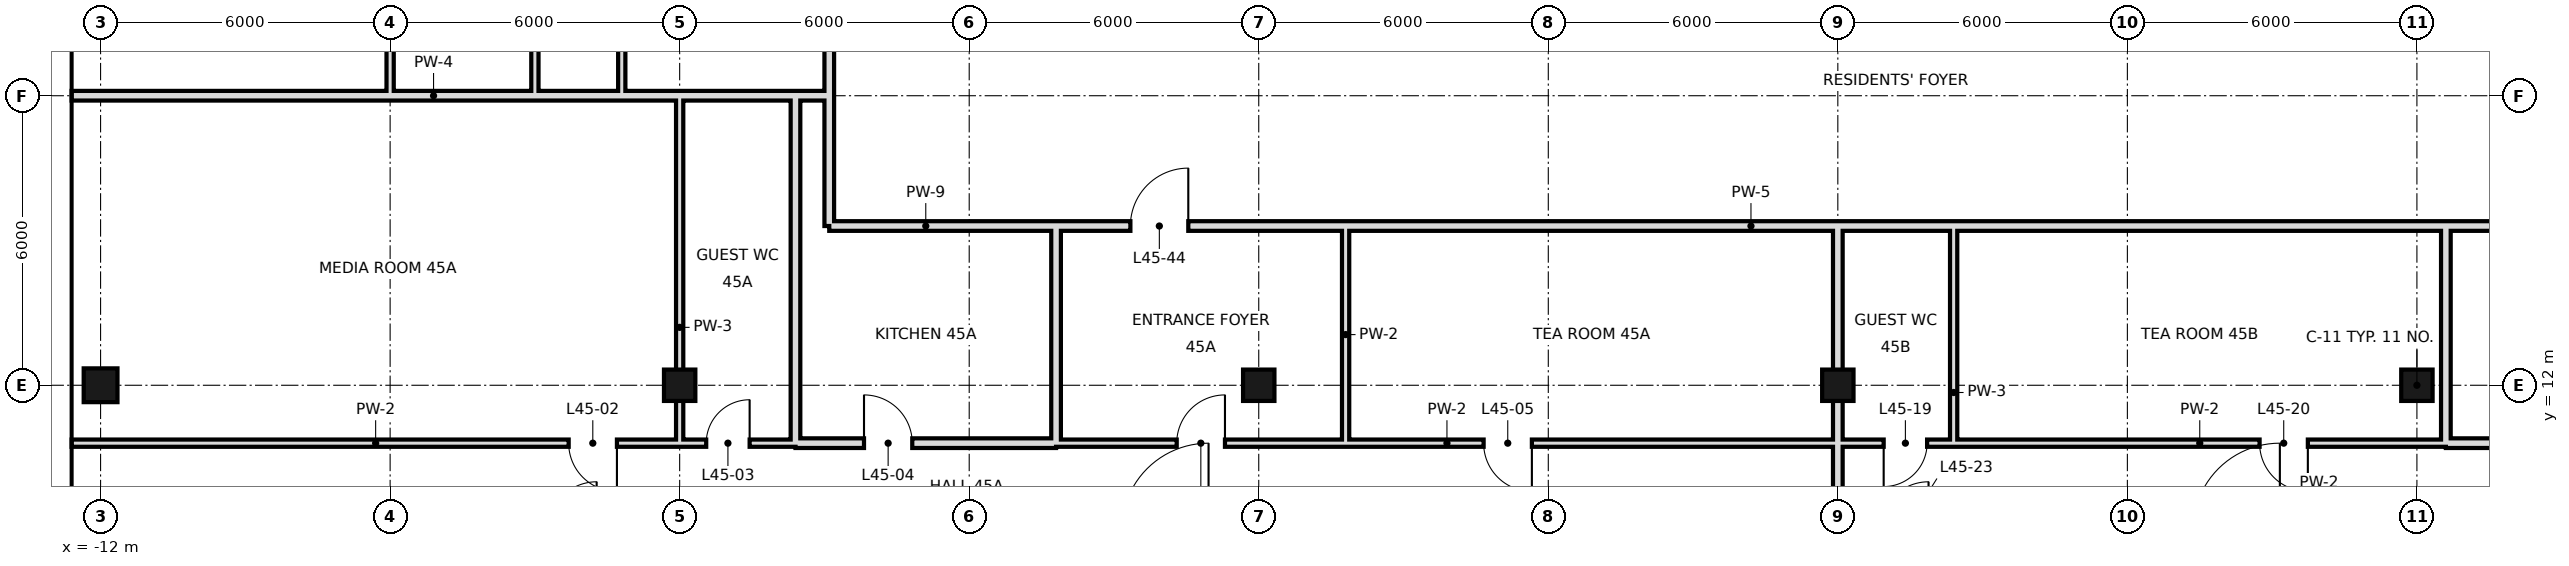
"""IFC4 building model, lengths in metres.
Left out: names, types, materials, properties, quantities, classifications, styles, units other than length and angle.
Written with IfcOpenShell. Run it as: python <this file> out.ifc"""

import sys

from ifc_helpers import new_model, si_unit, direction, frame, frame_2d, origin, origin_2d, place, context, subcontext, project, spatial, rectangle, hollow_rectangle, extrude, element, fill, save


model = new_model("IFC4")
c1 = context("Model", 3, precision=1e-05, world=origin(), true_north=direction((0.0, 1.0)))
c2 = subcontext(c1, "Body", "Model", "MODEL_VIEW")
j1 = project(units=[si_unit("LENGTHUNIT", "METRE"), si_unit("PLANEANGLEUNIT", "RADIAN")], contexts=[c1])
p1 = place(None, origin())
s1 = spatial("IfcSite", under=j1, at=p1, CompositionType="ELEMENT")
p2 = place(p1, origin())
s2 = spatial("IfcBuilding", under=s1, at=p2, CompositionType="ELEMENT")
p3 = place(p2, frame((0.0, 0.0, 195.6)))
s3 = spatial("IfcBuildingStorey", under=s2, at=p3, CompositionType="ELEMENT", Elevation=195.6)
p4 = place(p3, frame((-12.0, 12.0, 0.0), z_axis=(0.0, 0.0, 1.0), x_axis=(1.0, 0.0, 0.0)))
e1 = element("IfcColumn", 1, at=p4, inside=s3, PredefinedType="COLUMN", context=c2, shape_type="SweptSolid", body=[
    extrude(hollow_rectangle(XDim=0.7, YDim=0.7, WallThickness=0.036, at=origin_2d()), origin(), (0.0, 0.0, 1.0), 3.6),
])
for number, where, z_axis, x_axis in (
    (2, (0.0, 12.0, 0.0), (0.0, 0.0, 1.0), (1.0, 0.0, 0.0)),
    (3, (12.0, 12.0, 0.0), (0.0, 0.0, 1.0), (1.0, 0.0, 0.0)),
    (4, (24.0, 12.0, 0.0), (0.0, 0.0, 1.0), (1.0, 0.0, 0.0)),
    (5, (36.0, 12.0, 0.0), (0.0, 0.0, 1.0), (1.0, 0.0, 0.0)),
):
    element("IfcColumn", number, at=place(p3, frame(where, z_axis=z_axis, x_axis=x_axis)), inside=s3, PredefinedType="COLUMN", context=c2, shape_type="SweptSolid", body=[
        extrude(hollow_rectangle(XDim=0.65, YDim=0.65, WallThickness=0.032, at=origin_2d()), origin(), (0.0, 0.0, 1.0), 3.6),
    ])
p5 = place(p3, frame((-1.2, 18.0, 0.0), z_axis=(0.0, 0.0, 1.0), x_axis=(0.0, 1.0, 0.0)))
e6 = element("IfcWall", 6, at=p5, inside=s3, PredefinedType="PARTITIONING", context=c2, shape_type="SweptSolid", body=[
    extrude(rectangle(XDim=23.4, YDim=0.15, at=frame_2d((11.7, 0.0))), origin(), (0.0, 0.0, 1.0), 3.42),
])
p6 = place(p5, frame((20.5, 0.0, 0.0)))
e7 = element("IfcOpeningElement", 7, at=p6, cuts=e6, PredefinedType="OPENING", context=c2, shape_type="SweptSolid", body=[
    extrude(rectangle(XDim=1.0, YDim=2.4, at=frame_2d((0.5, 1.2))), frame((0.0, 0.085, 0.0), z_axis=(0.0, -1.0, 0.0), x_axis=(1.0, 0.0, 0.0)), (0.0, 0.0, 1.0), 0.17),
])
p7 = place(p5, frame((4.3, 0.0, 0.0)))
e8 = element("IfcOpeningElement", 8, at=p7, cuts=e6, PredefinedType="OPENING", context=c2, shape_type="SweptSolid", body=[
    extrude(rectangle(XDim=1.0, YDim=2.4, at=frame_2d((0.5, 1.2))), frame((0.0, 0.085, 0.0), z_axis=(0.0, -1.0, 0.0), x_axis=(1.0, 0.0, 0.0)), (0.0, 0.0, 1.0), 0.17),
])
p8 = place(p5, frame((15.1, 0.0, 0.0)))
e9 = element("IfcOpeningElement", 9, at=p8, cuts=e6, PredefinedType="OPENING", context=c2, shape_type="SweptSolid", body=[
    extrude(rectangle(XDim=1.0, YDim=2.4, at=frame_2d((0.5, 1.2))), frame((0.0, 0.085, 0.0), z_axis=(0.0, -1.0, 0.0), x_axis=(1.0, 0.0, 0.0)), (0.0, 0.0, 1.0), 0.17),
])
p9 = place(p3, frame((-3.0, 18.0, 0.0), z_axis=(0.0, 0.0, 1.0), x_axis=(0.0, 1.0, 0.0)))
e10 = element("IfcWall", 10, at=p9, inside=s3, PredefinedType="PARTITIONING", context=c2, shape_type="SweptSolid", body=[
    extrude(rectangle(XDim=12.0, YDim=0.15, at=frame_2d((6.0, 0.0))), origin(), (0.0, 0.0, 1.0), 3.42),
])
p10 = place(p9, frame((7.04, 0.0, 0.0)))
e11 = element("IfcOpeningElement", 11, at=p10, cuts=e10, PredefinedType="OPENING", context=c2, shape_type="SweptSolid", body=[
    extrude(rectangle(XDim=1.8, YDim=2.4, at=frame_2d((0.9, 1.2))), frame((0.0, 0.085, 0.0), z_axis=(0.0, -1.0, 0.0), x_axis=(1.0, 0.0, 0.0)), (0.0, 0.0, 1.0), 0.17),
])
p11 = place(p3, frame((-6.0, 18.0, 0.0), z_axis=(0.0, 0.0, 1.0), x_axis=(0.0, 1.0, 0.0)))
e12 = element("IfcWall", 12, at=p11, inside=s3, PredefinedType="PARTITIONING", context=c2, shape_type="SweptSolid", body=[
    extrude(rectangle(XDim=12.0, YDim=0.15, at=frame_2d((6.0, 0.0))), origin(), (0.0, 0.0, 1.0), 3.42),
])
p12 = place(p11, frame((7.04, 0.0, 0.0)))
e13 = element("IfcOpeningElement", 13, at=p12, cuts=e12, PredefinedType="OPENING", context=c2, shape_type="SweptSolid", body=[
    extrude(rectangle(XDim=1.8, YDim=2.4, at=frame_2d((0.9, 1.2))), frame((0.0, 0.085, 0.0), z_axis=(0.0, -1.0, 0.0), x_axis=(1.0, 0.0, 0.0)), (0.0, 0.0, 1.0), 0.17),
])
p13 = place(p3, frame((0.0, 10.8, 0.0), z_axis=(0.0, 0.0, 1.0), x_axis=(0.0, 1.0, 0.0)))
e14 = element("IfcWall", 14, at=p13, inside=s3, PredefinedType="PARTITIONING", context=c2, shape_type="SweptSolid", body=[
    extrude(rectangle(XDim=7.2, YDim=0.15, at=frame_2d((3.6, 0.0))), origin(), (0.0, 0.0, 1.0), 2.72),
])
p14 = place(p3, frame((13.8, 10.8, 0.0), z_axis=(0.0, 0.0, 1.0), x_axis=(0.0, 1.0, 0.0)))
e15 = element("IfcWall", 15, at=p14, inside=s3, PredefinedType="PARTITIONING", context=c2, shape_type="SweptSolid", body=[
    extrude(rectangle(XDim=4.5, YDim=0.15, at=frame_2d((2.25, 0.0))), origin(), (0.0, 0.0, 1.0), 3.42),
])
p15 = place(p3, frame((2.4, 10.8, 0.0), z_axis=(0.0, 0.0, 1.0), x_axis=(0.0, 1.0, 0.0)))
e16 = element("IfcWall", 16, at=p15, inside=s3, PredefinedType="SOLIDWALL", context=c2, shape_type="SweptSolid", body=[
    extrude(rectangle(XDim=7.2, YDim=0.2, at=frame_2d((3.6, 0.0))), origin(), (0.0, 0.0, 1.0), 2.72),
])
p16 = place(p3, frame((24.0, 0.0, 0.0), z_axis=(0.0, 0.0, 1.0), x_axis=(0.0, 1.0, 0.0)))
e17 = element("IfcWall", 17, at=p16, inside=s3, PredefinedType="SOLIDWALL", context=c2, shape_type="SweptSolid", body=[
    extrude(rectangle(XDim=15.3, YDim=0.2, at=frame_2d((7.65, 0.0))), origin(), (0.0, 0.0, 1.0), 2.72),
])
p17 = place(p3, frame((26.4, 10.8, 0.0), z_axis=(0.0, 0.0, 1.0), x_axis=(0.0, 1.0, 0.0)))
e18 = element("IfcWall", 18, at=p17, inside=s3, PredefinedType="PARTITIONING", context=c2, shape_type="SweptSolid", body=[
    extrude(rectangle(XDim=4.5, YDim=0.15, at=frame_2d((2.25, 0.0))), origin(), (0.0, 0.0, 1.0), 3.42),
])
p18 = place(p3, frame((3.1, 18.0, 0.0), z_axis=(0.0, 0.0, 1.0), x_axis=(0.0, 1.0, 0.0)))
e19 = element("IfcWall", 19, at=p18, inside=s3, PredefinedType="SOLIDWALL", context=c2, shape_type="SweptSolid", body=[
    extrude(rectangle(XDim=23.4, YDim=0.2, at=frame_2d((11.7, 0.0))), origin(), (0.0, 0.0, 1.0), 2.97),
])
p19 = place(p18, frame((20.4, 0.0, 0.0)))
e20 = element("IfcOpeningElement", 20, at=p19, cuts=e19, PredefinedType="OPENING", context=c2, shape_type="SweptSolid", body=[
    extrude(rectangle(XDim=1.2, YDim=2.4, at=frame_2d((0.6, 1.2))), frame((0.0, 0.11, 0.0), z_axis=(0.0, -1.0, 0.0), x_axis=(1.0, 0.0, 0.0)), (0.0, 0.0, 1.0), 0.22),
])
p20 = place(p3, frame((3.1, 15.3, 0.0), z_axis=(0.0, 0.0, 1.0), x_axis=(0.0, 1.0, 0.0)))
e21 = element("IfcWall", 21, at=p20, inside=s3, PredefinedType="SOLIDWALL", context=c2, shape_type="SweptSolid", body=[
    extrude(rectangle(XDim=2.7, YDim=0.2, at=frame_2d((1.35, 0.0))), origin(), (0.0, 0.0, 1.0), 2.97),
])
for number, where, z_axis, x_axis in (
    (22, (36.6, 10.8, 0.0), (0.0, 0.0, 1.0), (0.0, 1.0, 0.0)),
    (23, (7.8, 10.8, 0.0), (0.0, 0.0, 1.0), (0.0, 1.0, 0.0)),
):
    element("IfcWall", number, at=place(p3, frame(where, z_axis=z_axis, x_axis=x_axis)), inside=s3, PredefinedType="SOLIDWALL", context=c2, shape_type="SweptSolid", body=[
        extrude(rectangle(XDim=4.5, YDim=0.2, at=frame_2d((2.25, 0.0))), origin(), (0.0, 0.0, 1.0), 2.72),
    ])
p21 = place(p3, frame((2.4, 10.8, 0.0), z_axis=(0.0, 0.0, 1.0), x_axis=(1.0, 0.0, 0.0)))
e24 = element("IfcWall", 24, at=p21, inside=s3, PredefinedType="SOLIDWALL", context=c2, shape_type="SweptSolid", body=[
    extrude(rectangle(XDim=5.4, YDim=0.2, at=frame_2d((2.7, 0.0))), origin(), (0.0, 0.0, 1.0), 2.72),
])
p22 = place(p21, frame((1.42, 0.0, 0.0)))
e25 = element("IfcOpeningElement", 25, at=p22, cuts=e24, PredefinedType="OPENING", context=c2, shape_type="SweptSolid", body=[
    extrude(rectangle(XDim=1.0, YDim=2.4, at=frame_2d((0.5, 1.2))), frame((0.0, 0.11, 0.0), z_axis=(0.0, -1.0, 0.0), x_axis=(1.0, 0.0, 0.0)), (0.0, 0.0, 1.0), 0.22),
])
p23 = place(p3, frame((36.6, 10.8, 0.0), z_axis=(0.0, 0.0, 1.0), x_axis=(1.0, 0.0, 0.0)))
e26 = element("IfcWall", 26, at=p23, inside=s3, PredefinedType="SOLIDWALL", context=c2, shape_type="SweptSolid", body=[
    extrude(rectangle(XDim=5.4, YDim=0.2, at=frame_2d((2.7, 0.0))), origin(), (0.0, 0.0, 1.0), 2.72),
])
p24 = place(p23, frame((2.98, 0.0, 0.0)))
e27 = element("IfcOpeningElement", 27, at=p24, cuts=e26, PredefinedType="OPENING", context=c2, shape_type="SweptSolid", body=[
    extrude(rectangle(XDim=1.0, YDim=2.4, at=frame_2d((0.5, 1.2))), frame((0.0, 0.11, 0.0), z_axis=(0.0, -1.0, 0.0), x_axis=(1.0, 0.0, 0.0)), (0.0, 0.0, 1.0), 0.22),
])
p25 = place(p3, frame((-12.6, 10.8, 0.0), z_axis=(0.0, 0.0, 1.0), x_axis=(1.0, 0.0, 0.0)))
e28 = element("IfcWall", 28, at=p25, inside=s3, PredefinedType="PARTITIONING", context=c2, shape_type="SweptSolid", body=[
    extrude(rectangle(XDim=12.6, YDim=0.15, at=frame_2d((6.3, 0.0))), origin(), (0.0, 0.0, 1.0), 3.42),
])
p26 = place(p25, frame((10.3, 0.0, 0.0)))
e29 = element("IfcOpeningElement", 29, at=p26, cuts=e28, PredefinedType="OPENING", context=c2, shape_type="SweptSolid", body=[
    extrude(rectangle(XDim=1.0, YDim=2.4, at=frame_2d((0.5, 1.2))), frame((0.0, 0.085, 0.0), z_axis=(0.0, -1.0, 0.0), x_axis=(1.0, 0.0, 0.0)), (0.0, 0.0, 1.0), 0.17),
])
p27 = place(p3, frame((7.8, 10.8, 0.0), z_axis=(0.0, 0.0, 1.0), x_axis=(1.0, 0.0, 0.0)))
e30 = element("IfcWall", 30, at=p27, inside=s3, PredefinedType="PARTITIONING", context=c2, shape_type="SweptSolid", body=[
    extrude(rectangle(XDim=16.2, YDim=0.15, at=frame_2d((8.1, 0.0))), origin(), (0.0, 0.0, 1.0), 3.42),
])
p28 = place(p27, frame((2.5, 0.0, 0.0)))
e31 = element("IfcOpeningElement", 31, at=p28, cuts=e30, PredefinedType="OPENING", context=c2, shape_type="SweptSolid", body=[
    extrude(rectangle(XDim=1.0, YDim=2.4, at=frame_2d((0.5, 1.2))), frame((0.0, 0.085, 0.0), z_axis=(0.0, -1.0, 0.0), x_axis=(1.0, 0.0, 0.0)), (0.0, 0.0, 1.0), 0.17),
])
p29 = place(p27, frame((8.86, 0.0, 0.0)))
e32 = element("IfcOpeningElement", 32, at=p29, cuts=e30, PredefinedType="OPENING", context=c2, shape_type="SweptSolid", body=[
    extrude(rectangle(XDim=1.0, YDim=2.4, at=frame_2d((0.5, 1.2))), frame((0.0, 0.085, 0.0), z_axis=(0.0, -1.0, 0.0), x_axis=(1.0, 0.0, 0.0)), (0.0, 0.0, 1.0), 0.17),
])
p30 = place(p3, frame((26.4, 10.8, 0.0), z_axis=(0.0, 0.0, 1.0), x_axis=(1.0, 0.0, 0.0)))
e33 = element("IfcWall", 33, at=p30, inside=s3, PredefinedType="PARTITIONING", context=c2, shape_type="SweptSolid", body=[
    extrude(rectangle(XDim=10.2, YDim=0.15, at=frame_2d((5.1, 0.0))), origin(), (0.0, 0.0, 1.0), 3.42),
])
p31 = place(p30, frame((6.34, 0.0, 0.0)))
e34 = element("IfcOpeningElement", 34, at=p31, cuts=e33, PredefinedType="OPENING", context=c2, shape_type="SweptSolid", body=[
    extrude(rectangle(XDim=1.0, YDim=2.4, at=frame_2d((0.5, 1.2))), frame((0.0, 0.085, 0.0), z_axis=(0.0, -1.0, 0.0), x_axis=(1.0, 0.0, 0.0)), (0.0, 0.0, 1.0), 0.17),
])
p32 = place(p3, frame((0.0, 10.8, 0.0), z_axis=(0.0, 0.0, 1.0), x_axis=(1.0, 0.0, 0.0)))
e35 = element("IfcWall", 35, at=p32, inside=s3, PredefinedType="PARTITIONING", context=c2, shape_type="SweptSolid", body=[
    extrude(rectangle(XDim=2.4, YDim=0.15, at=frame_2d((1.2, 0.0))), origin(), (0.0, 0.0, 1.0), 3.42),
])
p33 = place(p32, frame((0.55, 0.0, 0.0)))
e36 = element("IfcOpeningElement", 36, at=p33, cuts=e35, PredefinedType="OPENING", context=c2, shape_type="SweptSolid", body=[
    extrude(rectangle(XDim=0.9, YDim=2.4, at=frame_2d((0.45, 1.2))), frame((0.0, 0.085, 0.0), z_axis=(0.0, -1.0, 0.0), x_axis=(1.0, 0.0, 0.0)), (0.0, 0.0, 1.0), 0.17),
])
p34 = place(p3, frame((24.0, 10.8, 0.0), z_axis=(0.0, 0.0, 1.0), x_axis=(1.0, 0.0, 0.0)))
e37 = element("IfcWall", 37, at=p34, inside=s3, PredefinedType="PARTITIONING", context=c2, shape_type="SweptSolid", body=[
    extrude(rectangle(XDim=2.4, YDim=0.15, at=frame_2d((1.2, 0.0))), origin(), (0.0, 0.0, 1.0), 3.42),
])
p35 = place(p34, frame((0.95, 0.0, 0.0)))
e38 = element("IfcOpeningElement", 38, at=p35, cuts=e37, PredefinedType="OPENING", context=c2, shape_type="SweptSolid", body=[
    extrude(rectangle(XDim=0.9, YDim=2.4, at=frame_2d((0.45, 1.2))), frame((0.0, 0.085, 0.0), z_axis=(0.0, -1.0, 0.0), x_axis=(1.0, 0.0, 0.0)), (0.0, 0.0, 1.0), 0.17),
])
p36 = place(p3, frame((7.8, 15.3, 0.0), z_axis=(0.0, 0.0, 1.0), x_axis=(1.0, 0.0, 0.0)))
e39 = element("IfcWall", 39, at=p36, inside=s3, PredefinedType="SOLIDWALL", context=c2, shape_type="SweptSolid", body=[
    extrude(rectangle(XDim=28.8, YDim=0.2, at=frame_2d((14.4, 0.0))), origin(), (0.0, 0.0, 1.0), 2.72),
])
p37 = place(p36, frame((1.54, 0.0, 0.0)))
e40 = element("IfcOpeningElement", 40, at=p37, cuts=e39, PredefinedType="OPENING", context=c2, shape_type="SweptSolid", body=[
    extrude(rectangle(XDim=1.2, YDim=2.4, at=frame_2d((0.6, 1.2))), frame((0.0, 0.11, 0.0), z_axis=(0.0, -1.0, 0.0), x_axis=(1.0, 0.0, 0.0)), (0.0, 0.0, 1.0), 0.22),
])
p38 = place(p3, frame((3.1, 15.3, 0.0), z_axis=(0.0, 0.0, 1.0), x_axis=(1.0, 0.0, 0.0)))
e41 = element("IfcWall", 41, at=p38, inside=s3, PredefinedType="SOLIDWALL", context=c2, shape_type="SweptSolid", body=[
    extrude(rectangle(XDim=4.7, YDim=0.2, at=frame_2d((2.35, 0.0))), origin(), (0.0, 0.0, 1.0), 2.72),
])
p39 = place(p3, frame((36.6, 15.3, 0.0), z_axis=(0.0, 0.0, 1.0), x_axis=(1.0, 0.0, 0.0)))
e42 = element("IfcWall", 42, at=p39, inside=s3, PredefinedType="SOLIDWALL", context=c2, shape_type="SweptSolid", body=[
    extrude(rectangle(XDim=5.4, YDim=0.2, at=frame_2d((2.7, 0.0))), origin(), (0.0, 0.0, 1.0), 2.72),
])
p40 = place(p3, frame((2.4, 18.0, 0.0), z_axis=(0.0, 0.0, 1.0), x_axis=(1.0, 0.0, 0.0)))
e43 = element("IfcWall", 43, at=p40, inside=s3, PredefinedType="SOLIDWALL", context=c2, shape_type="SweptSolid", body=[
    extrude(rectangle(XDim=0.7, YDim=0.2, at=frame_2d((0.35, 0.0))), origin(), (0.0, 0.0, 1.0), 2.97),
])
p41 = place(p3, frame((-12.6, 18.0, 0.0), z_axis=(0.0, 0.0, 1.0), x_axis=(1.0, 0.0, 0.0)))
e44 = element("IfcWall", 44, at=p41, inside=s3, PredefinedType="SOLIDWALL", context=c2, shape_type="SweptSolid", body=[
    extrude(rectangle(XDim=15.0, YDim=0.2, at=frame_2d((7.5, 0.0))), origin(), (0.0, 0.0, 1.0), 2.72),
])
p42 = place(p28, frame((1.0, 0.0, 0.0), z_axis=(0.0, 0.0, 1.0), x_axis=(-1.0, 0.0, 0.0)))
e45 = element("IfcDoor", 45, at=p42, inside=s3, OperationType="SINGLE_SWING_LEFT", PredefinedType="DOOR", context=c2, shape_type="SweptSolid", body=[
    extrude(rectangle(XDim=1.0, YDim=2.4, at=frame_2d((0.5, 1.2))), frame((0.0, 0.025, 0.0), z_axis=(0.0, -1.0, 0.0), x_axis=(1.0, 0.0, 0.0)), (0.0, 0.0, 1.0), 0.05),
])
fill(e31, e45)
p43 = place(p26, origin())
e46 = element("IfcDoor", 46, at=p43, inside=s3, OperationType="SINGLE_SWING_RIGHT", PredefinedType="DOOR", context=c2, shape_type="SweptSolid", body=[
    extrude(rectangle(XDim=1.0, YDim=2.4, at=frame_2d((0.5, 1.2))), frame((0.0, 0.025, 0.0), z_axis=(0.0, -1.0, 0.0), x_axis=(1.0, 0.0, 0.0)), (0.0, 0.0, 1.0), 0.05),
])
fill(e29, e46)
p44 = place(p33, frame((0.9, 0.0, 0.0), z_axis=(0.0, 0.0, 1.0), x_axis=(-1.0, 0.0, 0.0)))
e47 = element("IfcDoor", 47, at=p44, inside=s3, OperationType="SINGLE_SWING_LEFT", PredefinedType="DOOR", context=c2, shape_type="SweptSolid", body=[
    extrude(rectangle(XDim=0.9, YDim=2.4, at=frame_2d((0.45, 1.2))), frame((0.0, 0.025, 0.0), z_axis=(0.0, -1.0, 0.0), x_axis=(1.0, 0.0, 0.0)), (0.0, 0.0, 1.0), 0.05),
])
fill(e36, e47)
p45 = place(p22, origin())
e48 = element("IfcDoor", 48, at=p45, inside=s3, OperationType="SINGLE_SWING_LEFT", PredefinedType="DOOR", context=c2, shape_type="SweptSolid", body=[
    extrude(rectangle(XDim=1.0, YDim=2.4, at=frame_2d((0.5, 1.2))), frame((0.0, 0.025, 0.0), z_axis=(0.0, -1.0, 0.0), x_axis=(1.0, 0.0, 0.0)), (0.0, 0.0, 1.0), 0.05),
])
fill(e25, e48)
p46 = place(p29, origin())
e49 = element("IfcDoor", 49, at=p46, inside=s3, OperationType="SINGLE_SWING_RIGHT", PredefinedType="DOOR", context=c2, shape_type="SweptSolid", body=[
    extrude(rectangle(XDim=1.0, YDim=2.4, at=frame_2d((0.5, 1.2))), frame((0.0, 0.025, 0.0), z_axis=(0.0, -1.0, 0.0), x_axis=(1.0, 0.0, 0.0)), (0.0, 0.0, 1.0), 0.05),
])
fill(e32, e49)
p47 = place(p35, frame((0.9, 0.0, 0.0), z_axis=(0.0, 0.0, 1.0), x_axis=(-1.0, 0.0, 0.0)))
e50 = element("IfcDoor", 50, at=p47, inside=s3, OperationType="SINGLE_SWING_RIGHT", PredefinedType="DOOR", context=c2, shape_type="SweptSolid", body=[
    extrude(rectangle(XDim=0.9, YDim=2.4, at=frame_2d((0.45, 1.2))), frame((0.0, 0.025, 0.0), z_axis=(0.0, -1.0, 0.0), x_axis=(1.0, 0.0, 0.0)), (0.0, 0.0, 1.0), 0.05),
])
fill(e38, e50)
p48 = place(p31, origin())
e51 = element("IfcDoor", 51, at=p48, inside=s3, OperationType="SINGLE_SWING_RIGHT", PredefinedType="DOOR", context=c2, shape_type="SweptSolid", body=[
    extrude(rectangle(XDim=1.0, YDim=2.4, at=frame_2d((0.5, 1.2))), frame((0.0, 0.025, 0.0), z_axis=(0.0, -1.0, 0.0), x_axis=(1.0, 0.0, 0.0)), (0.0, 0.0, 1.0), 0.05),
])
fill(e34, e51)
p49 = place(p37, frame((1.2, 0.0, 0.0), z_axis=(0.0, 0.0, 1.0), x_axis=(-1.0, 0.0, 0.0)))
e52 = element("IfcDoor", 52, at=p49, inside=s3, OperationType="SINGLE_SWING_LEFT", PredefinedType="DOOR", context=c2, shape_type="SweptSolid", body=[
    extrude(rectangle(XDim=1.2, YDim=2.4, at=frame_2d((0.6, 1.2))), frame((0.0, 0.025, 0.0), z_axis=(0.0, -1.0, 0.0), x_axis=(1.0, 0.0, 0.0)), (0.0, 0.0, 1.0), 0.05),
])
fill(e40, e52)
save(model, sys.argv[1])
